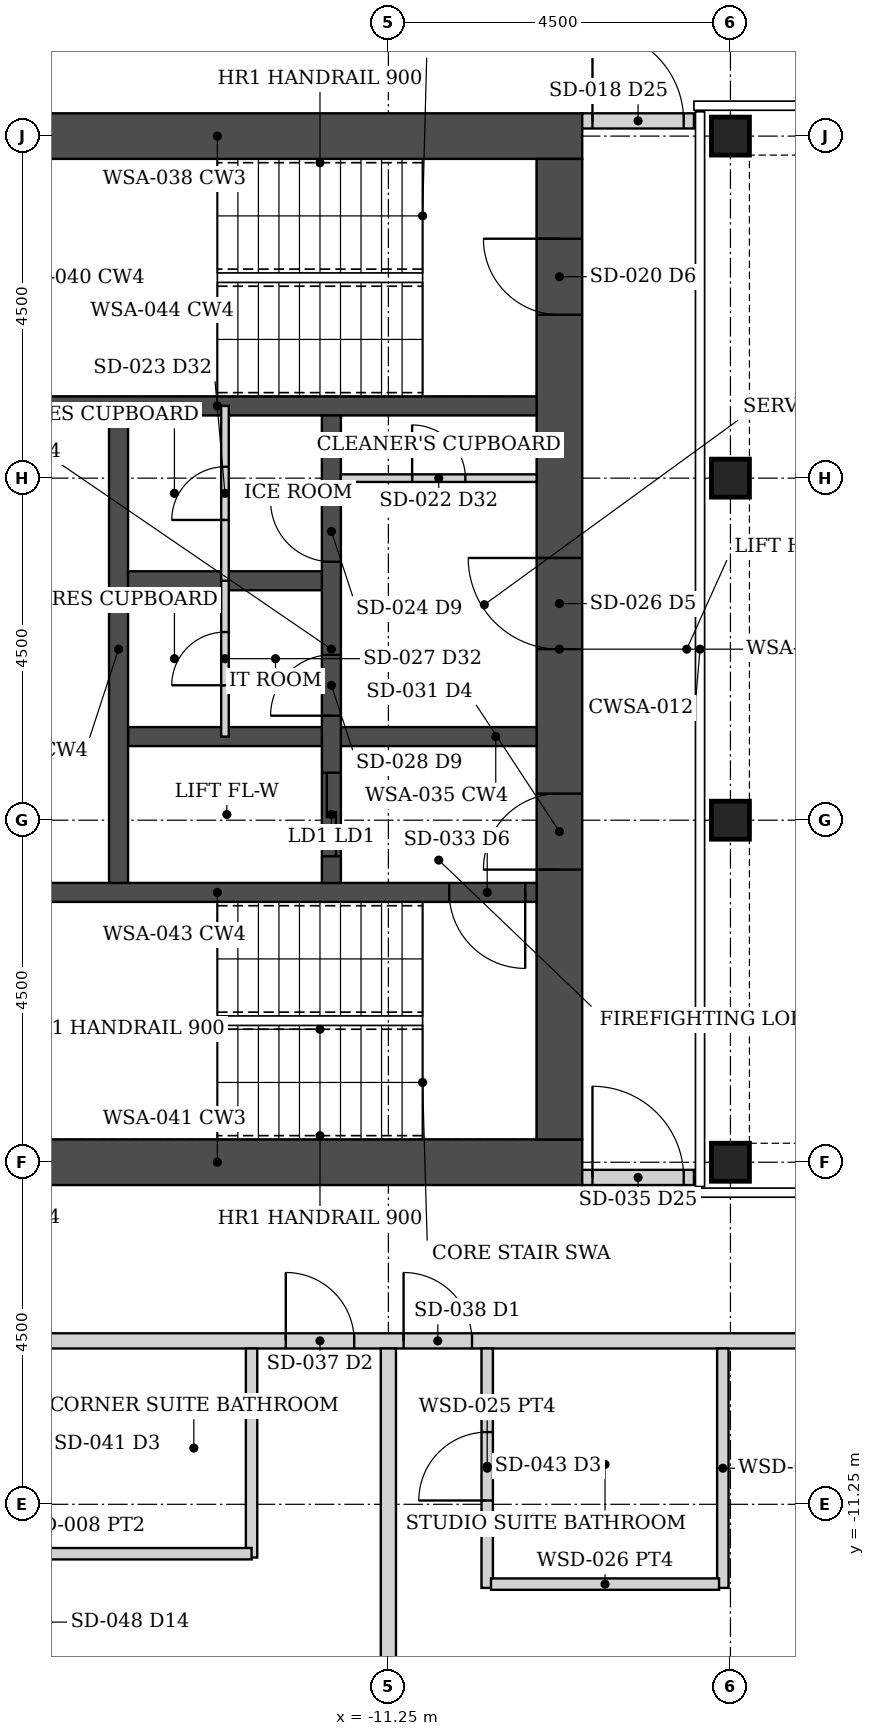
"""IFC4 building model, lengths in metres.
Left out: names, types, materials, properties, quantities, classifications, styles, units other than length and angle.
Written with IfcOpenShell. Run it as: python <this file> out.ifc"""

import sys

from ifc_helpers import new_model, si_unit, direction, frame, frame_2d, origin, origin_2d, place, context, subcontext, project, spatial, rectangle, hollow_rectangle, extrude, element, fill, save


model = new_model("IFC4")
c1 = context("Model", 3, precision=1e-05, world=origin(), true_north=direction((0.0, 1.0)))
c2 = subcontext(c1, "Body", "Model", "MODEL_VIEW")
j1 = project(units=[si_unit("LENGTHUNIT", "METRE"), si_unit("PLANEANGLEUNIT", "RADIAN")], contexts=[c1])
p1 = place(None, origin())
s1 = spatial("IfcSite", under=j1, at=p1, CompositionType="ELEMENT")
p2 = place(p1, origin())
s2 = spatial("IfcBuilding", under=s1, at=p2, CompositionType="ELEMENT")
p3 = place(p2, frame((0.0, 0.0, 234.55)))
s3 = spatial("IfcBuildingStorey", under=s2, at=p3, CompositionType="ELEMENT", Elevation=234.55)
for number, where, z_axis, x_axis in (
    (1, (-6.75, -6.75, 0.0), (0.0, 0.0, 1.0), (1.0, 0.0, 0.0)),
    (2, (-6.75, -2.25, 0.0), (0.0, 0.0, 1.0), (1.0, 0.0, 0.0)),
    (3, (-6.75, 2.25, 0.0), (0.0, 0.0, 1.0), (1.0, 0.0, 0.0)),
    (4, (-6.75, 6.75, 0.0), (0.0, 0.0, 1.0), (1.0, 0.0, 0.0)),
):
    element("IfcColumn", number, at=place(p3, frame(where, z_axis=z_axis, x_axis=x_axis)), inside=s3, PredefinedType="COLUMN", context=c2, shape_type="SweptSolid", body=[
        extrude(hollow_rectangle(XDim=0.5, YDim=0.5, WallThickness=0.025, at=origin_2d()), origin(), (0.0, 0.0, 1.0), 3.75),
    ])
for number, where, z_axis, x_axis in (
    (5, (-8.7, -6.75, 0.0), (0.0, 0.0, 1.0), (-1.0, 0.0, 0.0)),
    (6, (-8.7, 6.75, 0.0), (0.0, 0.0, 1.0), (-1.0, 0.0, 0.0)),
):
    element("IfcWall", number, at=place(p3, frame(where, z_axis=z_axis, x_axis=x_axis)), inside=s3, PredefinedType="SHEAR", context=c2, shape_type="SweptSolid", body=[
        extrude(rectangle(XDim=9.6, YDim=0.6, at=frame_2d((4.8, 0.0))), origin(), (0.0, 0.0, 1.0), 3.75),
    ])
p4 = place(p3, frame((-9.0, -6.45, 0.0), z_axis=(0.0, 0.0, 1.0), x_axis=(0.0, 1.0, 0.0)))
e7 = element("IfcWall", 7, at=p4, inside=s3, PredefinedType="SHEAR", context=c2, shape_type="SweptSolid", body=[
    extrude(rectangle(XDim=12.9, YDim=0.6, at=frame_2d((6.45, 0.0))), origin(), (0.0, 0.0, 1.0), 3.75),
])
p5 = place(p4, frame((3.55, 0.0, 0.0)))
e8 = element("IfcOpeningElement", 8, at=p5, cuts=e7, PredefinedType="OPENING", context=c2, shape_type="SweptSolid", body=[
    extrude(rectangle(XDim=1.0, YDim=2.1, at=frame_2d((0.5, 1.05))), frame((0.0, 0.31, 0.0), z_axis=(0.0, -1.0, 0.0), x_axis=(1.0, 0.0, 0.0)), (0.0, 0.0, 1.0), 0.62),
])
p6 = place(p4, frame((6.45, 0.0, 0.0)))
e9 = element("IfcOpeningElement", 9, at=p6, cuts=e7, PredefinedType="OPENING", context=c2, shape_type="SweptSolid", body=[
    extrude(rectangle(XDim=1.2, YDim=2.1, at=frame_2d((0.6, 1.05))), frame((0.0, 0.31, 0.0), z_axis=(0.0, -1.0, 0.0), x_axis=(1.0, 0.0, 0.0)), (0.0, 0.0, 1.0), 0.62),
])
p7 = place(p4, frame((10.85, 0.0, 0.0)))
e10 = element("IfcOpeningElement", 10, at=p7, cuts=e7, PredefinedType="OPENING", context=c2, shape_type="SweptSolid", body=[
    extrude(rectangle(XDim=1.0, YDim=2.1, at=frame_2d((0.5, 1.05))), frame((0.0, 0.31, 0.0), z_axis=(0.0, -1.0, 0.0), x_axis=(1.0, 0.0, 0.0)), (0.0, 0.0, 1.0), 0.62),
])
p8 = place(p3, frame((-9.3, -3.2, 0.0), z_axis=(0.0, 0.0, 1.0), x_axis=(-1.0, 0.0, 0.0)))
e11 = element("IfcWall", 11, at=p8, inside=s3, PredefinedType="SHEAR", context=c2, shape_type="SweptSolid", body=[
    extrude(rectangle(XDim=8.4, YDim=0.25, at=frame_2d((4.2, 0.0))), origin(), (0.0, 0.0, 1.0), 3.75),
])
p9 = place(p8, frame((0.15, 0.0, 0.0)))
e12 = element("IfcOpeningElement", 12, at=p9, cuts=e11, PredefinedType="OPENING", context=c2, shape_type="SweptSolid", body=[
    extrude(rectangle(XDim=1.0, YDim=2.1, at=frame_2d((0.5, 1.05))), frame((0.0, 0.135, 0.0), z_axis=(0.0, -1.0, 0.0), x_axis=(1.0, 0.0, 0.0)), (0.0, 0.0, 1.0), 0.27),
])
p10 = place(p3, frame((-9.3, 3.2, 0.0), z_axis=(0.0, 0.0, 1.0), x_axis=(-1.0, 0.0, 0.0)))
e13 = element("IfcWall", 13, at=p10, inside=s3, PredefinedType="SHEAR", context=c2, shape_type="SweptSolid", body=[
    extrude(rectangle(XDim=8.4, YDim=0.25, at=frame_2d((4.2, 0.0))), origin(), (0.0, 0.0, 1.0), 3.75),
])
p11 = place(p3, frame((-9.3, -1.15, 0.0), z_axis=(0.0, 0.0, 1.0), x_axis=(-1.0, 0.0, 0.0)))
e14 = element("IfcWall", 14, at=p11, inside=s3, PredefinedType="SHEAR", context=c2, shape_type="SweptSolid", body=[
    extrude(rectangle(XDim=5.375, YDim=0.25, at=frame_2d((2.688, 0.0))), origin(), (0.0, 0.0, 1.0), 3.75),
])
p12 = place(p3, frame((-12.0, -3.075, 0.0), z_axis=(0.0, 0.0, 1.0), x_axis=(0.0, 1.0, 0.0)))
e15 = element("IfcWall", 15, at=p12, inside=s3, PredefinedType="SHEAR", context=c2, shape_type="SweptSolid", body=[
    extrude(rectangle(XDim=6.15, YDim=0.25, at=frame_2d((3.075, 0.0))), origin(), (0.0, 0.0, 1.0), 3.75),
])
p13 = place(p12, frame((2.2, 0.0, 0.0)))
e16 = element("IfcOpeningElement", 16, at=p13, cuts=e15, PredefinedType="OPENING", context=c2, shape_type="SweptSolid", body=[
    extrude(rectangle(XDim=0.8, YDim=2.1, at=frame_2d((0.4, 1.05))), frame((0.0, 0.135, 0.0), z_axis=(0.0, -1.0, 0.0), x_axis=(1.0, 0.0, 0.0)), (0.0, 0.0, 1.0), 0.27),
])
p14 = place(p12, frame((4.225, 0.0, 0.0)))
e17 = element("IfcOpeningElement", 17, at=p14, cuts=e15, PredefinedType="OPENING", context=c2, shape_type="SweptSolid", body=[
    extrude(rectangle(XDim=0.8, YDim=2.1, at=frame_2d((0.4, 1.05))), frame((0.0, 0.135, 0.0), z_axis=(0.0, -1.0, 0.0), x_axis=(1.0, 0.0, 0.0)), (0.0, 0.0, 1.0), 0.27),
])
p15 = place(p12, frame((0.35, 0.0, 0.0)))
e18 = element("IfcOpeningElement", 18, at=p15, cuts=e15, PredefinedType="OPENING", context=c2, shape_type="SweptSolid", body=[
    extrude(rectangle(XDim=1.1, YDim=2.1, at=frame_2d((0.55, 1.05))), frame((0.0, 0.135, 0.0), z_axis=(0.0, -1.0, 0.0), x_axis=(1.0, 0.0, 0.0)), (0.0, 0.0, 1.0), 0.27),
])
p16 = place(p3, frame((-14.8, -3.075, 0.0), z_axis=(0.0, 0.0, 1.0), x_axis=(0.0, 1.0, 0.0)))
e19 = element("IfcWall", 19, at=p16, inside=s3, PredefinedType="SHEAR", context=c2, shape_type="SweptSolid", body=[
    extrude(rectangle(XDim=6.15, YDim=0.25, at=frame_2d((3.075, 0.0))), origin(), (0.0, 0.0, 1.0), 3.75),
])
p17 = place(p3, frame((-12.125, 0.9, 0.0), z_axis=(0.0, 0.0, 1.0), x_axis=(-1.0, 0.0, 0.0)))
e20 = element("IfcWall", 20, at=p17, inside=s3, PredefinedType="SHEAR", context=c2, shape_type="SweptSolid", body=[
    extrude(rectangle(XDim=2.55, YDim=0.25, at=frame_2d((1.275, 0.0))), origin(), (0.0, 0.0, 1.0), 3.75),
])
p18 = place(p3, frame((-8.7, 6.95, 0.0), z_axis=(0.0, 0.0, 1.0), x_axis=(1.0, 0.0, 0.0)))
e21 = element("IfcWall", 21, at=p18, inside=s3, PredefinedType="PARTITIONING", context=c2, shape_type="SweptSolid", body=[
    extrude(rectangle(XDim=1.47, YDim=0.2, at=frame_2d((0.735, 0.0))), origin(), (0.0, 0.0, 1.0), 2.629),
])
p19 = place(p18, frame((0.135, 0.0, 0.0)))
e22 = element("IfcOpeningElement", 22, at=p19, cuts=e21, PredefinedType="OPENING", context=c2, shape_type="SweptSolid", body=[
    extrude(rectangle(XDim=1.2, YDim=2.1, at=frame_2d((0.6, 1.05))), frame((0.0, 0.11, 0.0), z_axis=(0.0, -1.0, 0.0), x_axis=(1.0, 0.0, 0.0)), (0.0, 0.0, 1.0), 0.22),
])
p20 = place(p3, frame((-8.7, -6.95, 0.0), z_axis=(0.0, 0.0, 1.0), x_axis=(1.0, 0.0, 0.0)))
e23 = element("IfcWall", 23, at=p20, inside=s3, PredefinedType="PARTITIONING", context=c2, shape_type="SweptSolid", body=[
    extrude(rectangle(XDim=1.47, YDim=0.2, at=frame_2d((0.735, 0.0))), origin(), (0.0, 0.0, 1.0), 2.629),
])
p21 = place(p20, frame((0.135, 0.0, 0.0)))
e24 = element("IfcOpeningElement", 24, at=p21, cuts=e23, PredefinedType="OPENING", context=c2, shape_type="SweptSolid", body=[
    extrude(rectangle(XDim=1.2, YDim=2.1, at=frame_2d((0.6, 1.05))), frame((0.0, 0.11, 0.0), z_axis=(0.0, -1.0, 0.0), x_axis=(1.0, 0.0, 0.0)), (0.0, 0.0, 1.0), 0.22),
])
p22 = place(p3, frame((-20.05, -9.1, 0.0), z_axis=(0.0, 0.0, 1.0), x_axis=(1.0, 0.0, 0.0)))
e25 = element("IfcWall", 25, at=p22, inside=s3, PredefinedType="PARTITIONING", context=c2, shape_type="SweptSolid", body=[
    extrude(rectangle(XDim=40.1, YDim=0.2, at=frame_2d((20.05, 0.0))), origin(), (0.0, 0.0, 1.0), 2.629),
])
p23 = place(p22, frame((9.0, 0.0, 0.0)))
e26 = element("IfcOpeningElement", 26, at=p23, cuts=e25, PredefinedType="OPENING", context=c2, shape_type="SweptSolid", body=[
    extrude(rectangle(XDim=0.9, YDim=2.1, at=frame_2d((0.45, 1.05))), frame((0.0, 0.11, 0.0), z_axis=(0.0, -1.0, 0.0), x_axis=(1.0, 0.0, 0.0)), (0.0, 0.0, 1.0), 0.22),
])
p24 = place(p22, frame((18.1, 0.0, 0.0)))
e27 = element("IfcOpeningElement", 27, at=p24, cuts=e25, PredefinedType="OPENING", context=c2, shape_type="SweptSolid", body=[
    extrude(rectangle(XDim=0.9, YDim=2.1, at=frame_2d((0.45, 1.05))), frame((0.0, 0.11, 0.0), z_axis=(0.0, -1.0, 0.0), x_axis=(1.0, 0.0, 0.0)), (0.0, 0.0, 1.0), 0.22),
])
p25 = place(p22, frame((31.75, 0.0, 0.0)))
e28 = element("IfcOpeningElement", 28, at=p25, cuts=e25, PredefinedType="OPENING", context=c2, shape_type="SweptSolid", body=[
    extrude(rectangle(XDim=0.9, YDim=2.1, at=frame_2d((0.45, 1.05))), frame((0.0, 0.11, 0.0), z_axis=(0.0, -1.0, 0.0), x_axis=(1.0, 0.0, 0.0)), (0.0, 0.0, 1.0), 0.22),
])
p26 = place(p22, frame((7.45, 0.0, 0.0)))
e29 = element("IfcOpeningElement", 29, at=p26, cuts=e25, PredefinedType="OPENING", context=c2, shape_type="SweptSolid", body=[
    extrude(rectangle(XDim=0.9, YDim=2.1, at=frame_2d((0.45, 1.05))), frame((0.0, 0.11, 0.0), z_axis=(0.0, -1.0, 0.0), x_axis=(1.0, 0.0, 0.0)), (0.0, 0.0, 1.0), 0.22),
])
p27 = place(p3, frame((-9.95, -12.35, 0.0), z_axis=(0.0, 0.0, 1.0), x_axis=(0.0, 1.0, 0.0)))
e30 = element("IfcWall", 30, at=p27, inside=s3, PredefinedType="PARTITIONING", context=c2, shape_type="SweptSolid", body=[
    extrude(rectangle(XDim=3.15, YDim=0.15, at=frame_2d((1.575, 0.0))), origin(), (0.0, 0.0, 1.0), 2.629),
])
p28 = place(p27, frame((1.15, 0.0, 0.0)))
e31 = element("IfcOpeningElement", 31, at=p28, cuts=e30, PredefinedType="OPENING", context=c2, shape_type="SweptSolid", body=[
    extrude(rectangle(XDim=0.9, YDim=2.1, at=frame_2d((0.45, 1.05))), frame((0.0, 0.085, 0.0), z_axis=(0.0, -1.0, 0.0), x_axis=(1.0, 0.0, 0.0)), (0.0, 0.0, 1.0), 0.17),
])
p29 = place(p3, frame((-6.85, -12.35, 0.0), z_axis=(0.0, 0.0, 1.0), x_axis=(0.0, 1.0, 0.0)))
e32 = element("IfcWall", 32, at=p29, inside=s3, PredefinedType="PARTITIONING", context=c2, shape_type="SweptSolid", body=[
    extrude(rectangle(XDim=3.15, YDim=0.15, at=frame_2d((1.575, 0.0))), origin(), (0.0, 0.0, 1.0), 2.629),
])
p30 = place(p3, frame((-9.9, -12.3, 0.0), z_axis=(0.0, 0.0, 1.0), x_axis=(1.0, 0.0, 0.0)))
e33 = element("IfcWall", 33, at=p30, inside=s3, PredefinedType="PARTITIONING", context=c2, shape_type="SweptSolid", body=[
    extrude(rectangle(XDim=3.0, YDim=0.15, at=frame_2d((1.5, 0.0))), origin(), (0.0, 0.0, 1.0), 2.629),
])
p31 = place(p3, frame((-11.25, -19.9, 0.0), z_axis=(0.0, 0.0, 1.0), x_axis=(0.0, 1.0, 0.0)))
e34 = element("IfcWall", 34, at=p31, inside=s3, PredefinedType="PARTITIONING", context=c2, shape_type="SweptSolid", body=[
    extrude(rectangle(XDim=10.7, YDim=0.2, at=frame_2d((5.35, 0.0))), origin(), (0.0, 0.0, 1.0), 2.629),
])
p32 = place(p3, frame((-13.05, -11.95, 0.0), z_axis=(0.0, 0.0, 1.0), x_axis=(0.0, 1.0, 0.0)))
e35 = element("IfcWall", 35, at=p32, inside=s3, PredefinedType="PARTITIONING", context=c2, shape_type="SweptSolid", body=[
    extrude(rectangle(XDim=2.75, YDim=0.15, at=frame_2d((1.375, 0.0))), origin(), (0.0, 0.0, 1.0), 2.629),
])
p33 = place(p3, frame((-15.75, -11.9, 0.0), z_axis=(0.0, 0.0, 1.0), x_axis=(1.0, 0.0, 0.0)))
e36 = element("IfcWall", 36, at=p33, inside=s3, PredefinedType="PARTITIONING", context=c2, shape_type="SweptSolid", body=[
    extrude(rectangle(XDim=2.7, YDim=0.15, at=frame_2d((1.35, 0.0))), origin(), (0.0, 0.0, 1.0), 2.629),
])
p34 = place(p3, frame((-11.875, 2.25, 0.0), z_axis=(0.0, 0.0, 1.0), x_axis=(1.0, 0.0, 0.0)))
e37 = element("IfcWall", 37, at=p34, inside=s3, PredefinedType="PARTITIONING", context=c2, shape_type="SweptSolid", body=[
    extrude(rectangle(XDim=2.575, YDim=0.1, at=frame_2d((1.288, 0.0))), origin(), (0.0, 0.0, 1.0), 2.629),
])
p35 = place(p34, frame((0.938, 0.0, 0.0)))
e38 = element("IfcOpeningElement", 38, at=p35, cuts=e37, PredefinedType="OPENING", context=c2, shape_type="SweptSolid", body=[
    extrude(rectangle(XDim=0.7, YDim=2.1, at=frame_2d((0.35, 1.05))), frame((0.0, 0.06, 0.0), z_axis=(0.0, -1.0, 0.0), x_axis=(1.0, 0.0, 0.0)), (0.0, 0.0, 1.0), 0.12),
])
p36 = place(p3, frame((-13.4, -1.15, 0.0), z_axis=(0.0, 0.0, 1.0), x_axis=(0.0, 1.0, 0.0)))
e39 = element("IfcWall", 39, at=p36, inside=s3, PredefinedType="PARTITIONING", context=c2, shape_type="SweptSolid", body=[
    extrude(rectangle(XDim=2.05, YDim=0.1, at=frame_2d((1.025, 0.0))), origin(), (0.0, 0.0, 1.0), 2.629),
])
p37 = place(p36, frame((0.675, 0.0, 0.0)))
e40 = element("IfcOpeningElement", 40, at=p37, cuts=e39, PredefinedType="OPENING", context=c2, shape_type="SweptSolid", body=[
    extrude(rectangle(XDim=0.7, YDim=2.1, at=frame_2d((0.35, 1.05))), frame((0.0, 0.06, 0.0), z_axis=(0.0, -1.0, 0.0), x_axis=(1.0, 0.0, 0.0)), (0.0, 0.0, 1.0), 0.12),
])
p38 = place(p3, frame((-13.4, 0.9, 0.0), z_axis=(0.0, 0.0, 1.0), x_axis=(0.0, 1.0, 0.0)))
e41 = element("IfcWall", 41, at=p38, inside=s3, PredefinedType="PARTITIONING", context=c2, shape_type="SweptSolid", body=[
    extrude(rectangle(XDim=2.3, YDim=0.1, at=frame_2d((1.15, 0.0))), origin(), (0.0, 0.0, 1.0), 2.629),
])
p39 = place(p38, frame((0.8, 0.0, 0.0)))
e42 = element("IfcOpeningElement", 42, at=p39, cuts=e41, PredefinedType="OPENING", context=c2, shape_type="SweptSolid", body=[
    extrude(rectangle(XDim=0.7, YDim=2.1, at=frame_2d((0.35, 1.05))), frame((0.0, 0.06, 0.0), z_axis=(0.0, -1.0, 0.0), x_axis=(1.0, 0.0, 0.0)), (0.0, 0.0, 1.0), 0.12),
])
p40 = place(p19, origin())
e43 = element("IfcDoor", 43, at=p40, inside=s3, OperationType="DOUBLE_DOOR_DOUBLE_SWING", PredefinedType="DOOR", context=c2, shape_type="SweptSolid", body=[
    extrude(rectangle(XDim=1.2, YDim=2.1, at=frame_2d((0.6, 1.05))), frame((0.0, 0.025, 0.0), z_axis=(0.0, -1.0, 0.0), x_axis=(1.0, 0.0, 0.0)), (0.0, 0.0, 1.0), 0.05),
])
fill(e22, e43)
p41 = place(p21, origin())
e44 = element("IfcDoor", 44, at=p41, inside=s3, OperationType="DOUBLE_DOOR_DOUBLE_SWING", PredefinedType="DOOR", context=c2, shape_type="SweptSolid", body=[
    extrude(rectangle(XDim=1.2, YDim=2.1, at=frame_2d((0.6, 1.05))), frame((0.0, 0.025, 0.0), z_axis=(0.0, -1.0, 0.0), x_axis=(1.0, 0.0, 0.0)), (0.0, 0.0, 1.0), 0.05),
])
fill(e24, e44)
p42 = place(p23, origin())
e45 = element("IfcDoor", 45, at=p42, inside=s3, OperationType="SINGLE_SWING_LEFT", PredefinedType="DOOR", context=c2, shape_type="SweptSolid", body=[
    extrude(rectangle(XDim=0.9, YDim=2.1, at=frame_2d((0.45, 1.05))), frame((0.0, 0.025, 0.0), z_axis=(0.0, -1.0, 0.0), x_axis=(1.0, 0.0, 0.0)), (0.0, 0.0, 1.0), 0.05),
])
fill(e26, e45)
p43 = place(p28, origin())
e46 = element("IfcDoor", 46, at=p43, inside=s3, OperationType="SINGLE_SWING_LEFT", PredefinedType="DOOR", context=c2, shape_type="SweptSolid", body=[
    extrude(rectangle(XDim=0.9, YDim=2.1, at=frame_2d((0.45, 1.05))), frame((0.0, 0.025, 0.0), z_axis=(0.0, -1.0, 0.0), x_axis=(1.0, 0.0, 0.0)), (0.0, 0.0, 1.0), 0.05),
])
fill(e31, e46)
p44 = place(p26, origin())
e47 = element("IfcDoor", 47, at=p44, inside=s3, OperationType="SINGLE_SWING_LEFT", PredefinedType="DOOR", context=c2, shape_type="SweptSolid", body=[
    extrude(rectangle(XDim=0.9, YDim=2.1, at=frame_2d((0.45, 1.05))), frame((0.0, 0.025, 0.0), z_axis=(0.0, -1.0, 0.0), x_axis=(1.0, 0.0, 0.0)), (0.0, 0.0, 1.0), 0.05),
])
fill(e29, e47)
p45 = place(p5, origin())
e48 = element("IfcDoor", 48, at=p45, inside=s3, OperationType="SINGLE_SWING_LEFT", PredefinedType="DOOR", context=c2, shape_type="SweptSolid", body=[
    extrude(rectangle(XDim=1.0, YDim=2.1, at=frame_2d((0.5, 1.05))), frame((0.0, 0.025, 0.0), z_axis=(0.0, -1.0, 0.0), x_axis=(1.0, 0.0, 0.0)), (0.0, 0.0, 1.0), 0.05),
])
fill(e8, e48)
p46 = place(p9, origin())
e49 = element("IfcDoor", 49, at=p46, inside=s3, OperationType="SINGLE_SWING_LEFT", PredefinedType="DOOR", context=c2, shape_type="SweptSolid", body=[
    extrude(rectangle(XDim=1.0, YDim=2.1, at=frame_2d((0.5, 1.05))), frame((0.0, 0.025, 0.0), z_axis=(0.0, -1.0, 0.0), x_axis=(1.0, 0.0, 0.0)), (0.0, 0.0, 1.0), 0.05),
])
fill(e12, e49)
p47 = place(p35, origin())
e50 = element("IfcDoor", 50, at=p47, inside=s3, OperationType="SINGLE_SWING_LEFT", PredefinedType="DOOR", context=c2, shape_type="SweptSolid", body=[
    extrude(rectangle(XDim=0.7, YDim=2.1, at=frame_2d((0.35, 1.05))), frame((0.0, 0.025, 0.0), z_axis=(0.0, -1.0, 0.0), x_axis=(1.0, 0.0, 0.0)), (0.0, 0.0, 1.0), 0.05),
])
fill(e38, e50)
p48 = place(p6, origin())
e51 = element("IfcDoor", 51, at=p48, inside=s3, OperationType="SINGLE_SWING_RIGHT", PredefinedType="DOOR", context=c2, shape_type="SweptSolid", body=[
    extrude(rectangle(XDim=1.2, YDim=2.1, at=frame_2d((0.6, 1.05))), frame((0.0, 0.025, 0.0), z_axis=(0.0, -1.0, 0.0), x_axis=(1.0, 0.0, 0.0)), (0.0, 0.0, 1.0), 0.05),
])
fill(e9, e51)
p49 = place(p37, origin())
e52 = element("IfcDoor", 52, at=p49, inside=s3, OperationType="SINGLE_SWING_LEFT", PredefinedType="DOOR", context=c2, shape_type="SweptSolid", body=[
    extrude(rectangle(XDim=0.7, YDim=2.1, at=frame_2d((0.35, 1.05))), frame((0.0, 0.025, 0.0), z_axis=(0.0, -1.0, 0.0), x_axis=(1.0, 0.0, 0.0)), (0.0, 0.0, 1.0), 0.05),
])
fill(e40, e52)
p50 = place(p13, origin())
e53 = element("IfcDoor", 53, at=p50, inside=s3, OperationType="SINGLE_SWING_LEFT", PredefinedType="DOOR", context=c2, shape_type="SweptSolid", body=[
    extrude(rectangle(XDim=0.8, YDim=2.1, at=frame_2d((0.4, 1.05))), frame((0.0, 0.025, 0.0), z_axis=(0.0, -1.0, 0.0), x_axis=(1.0, 0.0, 0.0)), (0.0, 0.0, 1.0), 0.05),
])
fill(e16, e53)
p51 = place(p39, origin())
e54 = element("IfcDoor", 54, at=p51, inside=s3, OperationType="SINGLE_SWING_LEFT", PredefinedType="DOOR", context=c2, shape_type="SweptSolid", body=[
    extrude(rectangle(XDim=0.7, YDim=2.1, at=frame_2d((0.35, 1.05))), frame((0.0, 0.025, 0.0), z_axis=(0.0, -1.0, 0.0), x_axis=(1.0, 0.0, 0.0)), (0.0, 0.0, 1.0), 0.05),
])
fill(e42, e54)
p52 = place(p14, origin())
e55 = element("IfcDoor", 55, at=p52, inside=s3, OperationType="SINGLE_SWING_RIGHT", PredefinedType="DOOR", context=c2, shape_type="SweptSolid", body=[
    extrude(rectangle(XDim=0.8, YDim=2.1, at=frame_2d((0.4, 1.05))), frame((0.0, 0.025, 0.0), z_axis=(0.0, -1.0, 0.0), x_axis=(1.0, 0.0, 0.0)), (0.0, 0.0, 1.0), 0.05),
])
fill(e17, e55)
p53 = place(p7, origin())
e56 = element("IfcDoor", 56, at=p53, inside=s3, OperationType="SINGLE_SWING_RIGHT", PredefinedType="DOOR", context=c2, shape_type="SweptSolid", body=[
    extrude(rectangle(XDim=1.0, YDim=2.1, at=frame_2d((0.5, 1.05))), frame((0.0, 0.025, 0.0), z_axis=(0.0, -1.0, 0.0), x_axis=(1.0, 0.0, 0.0)), (0.0, 0.0, 1.0), 0.05),
])
fill(e10, e56)
p54 = place(p15, origin())
e57 = element("IfcDoor", 57, at=p54, inside=s3, OperationType="DOUBLE_DOOR_SLIDING", PredefinedType="DOOR", context=c2, shape_type="SweptSolid", body=[
    extrude(rectangle(XDim=1.1, YDim=2.1, at=frame_2d((0.55, 1.05))), frame((0.0, 0.025, 0.0), z_axis=(0.0, -1.0, 0.0), x_axis=(1.0, 0.0, 0.0)), (0.0, 0.0, 1.0), 0.05),
])
fill(e18, e57)
save(model, sys.argv[1])
